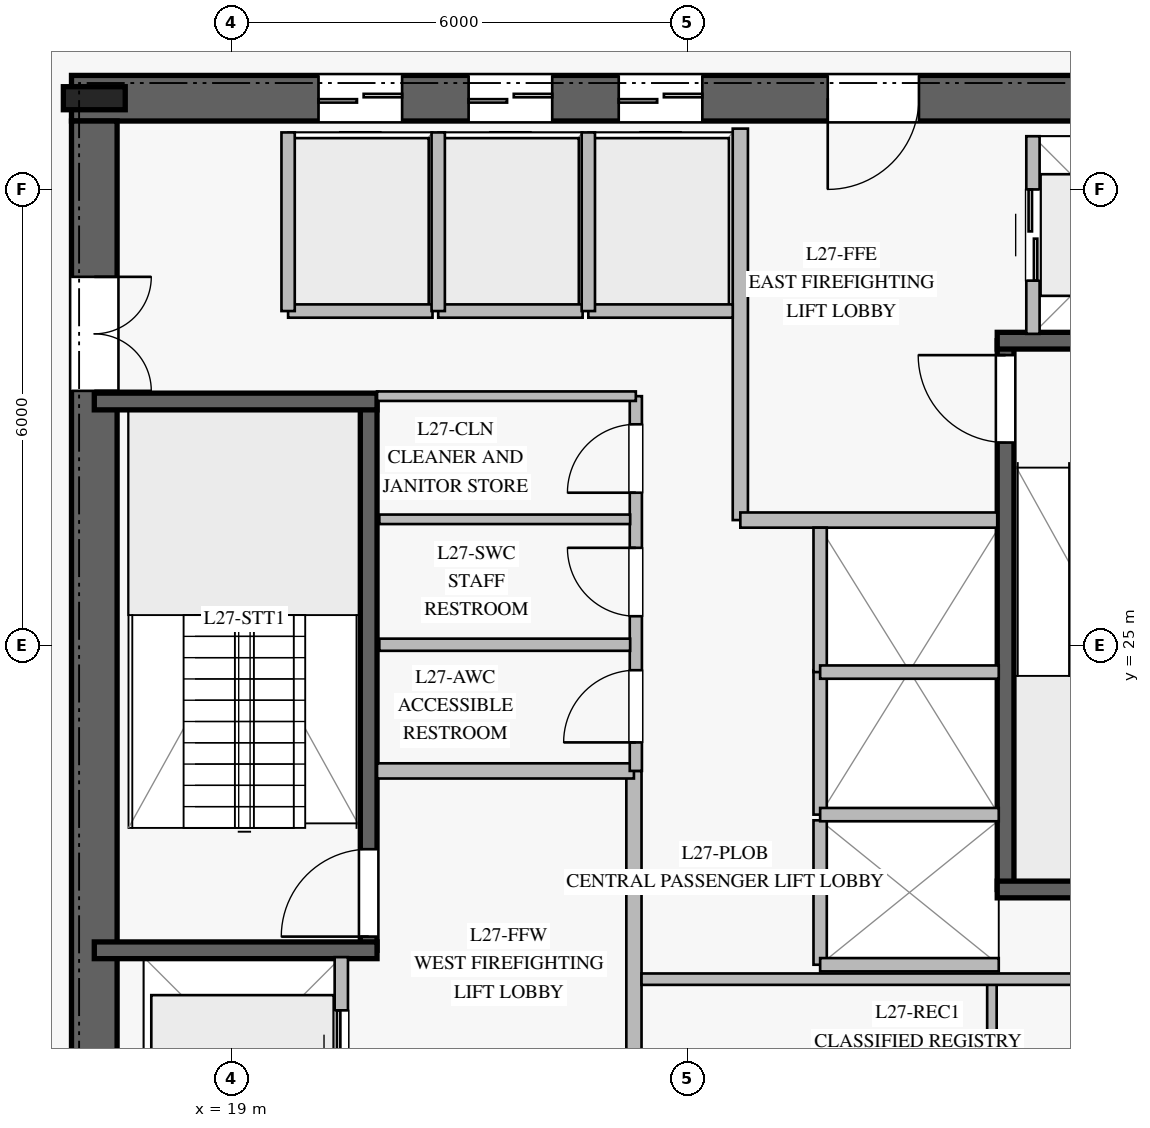
"""IFC4 building model, lengths in metres.
Left out: names, types, materials, properties, quantities, classifications, styles, units other than length and angle.
Written with IfcOpenShell. Run it as: python <this file> out.ifc"""

import sys

from ifc_helpers import new_model, si_unit, direction, frame, frame_2d, origin, origin_2d, place, context, subcontext, project, spatial, rectangle, i_section, extrude, element, fill, save


model = new_model("IFC4")
c1 = context("Model", 3, precision=1e-05, world=origin(), true_north=direction((0.0, 1.0)))
c2 = subcontext(c1, "Body", "Model", "MODEL_VIEW")
j1 = project(units=[si_unit("LENGTHUNIT", "METRE"), si_unit("PLANEANGLEUNIT", "RADIAN")], contexts=[c1])
p1 = place(None, origin())
s1 = spatial("IfcSite", under=j1, at=p1, CompositionType="ELEMENT")
p2 = place(p1, origin())
s2 = spatial("IfcBuilding", under=s1, at=p2, CompositionType="ELEMENT")
p3 = place(p2, frame((0.0, 0.0, 114.4)))
s3 = spatial("IfcBuildingStorey", under=s2, at=p3, CompositionType="ELEMENT", Elevation=114.4)
p4 = place(p3, frame((33.1, 32.2, 0.0), z_axis=(0.0, 0.0, 1.0), x_axis=(-1.0, 0.0, 0.0)))
e1 = element("IfcWall", 1, at=p4, inside=s3, PredefinedType="SHEAR", context=c2, shape_type="SweptSolid", body=[
    extrude(rectangle(XDim=16.2, YDim=0.6, at=frame_2d((8.1, 0.0))), origin(), (0.0, 0.0, 1.0), 3.76),
])
p5 = place(p4, frame((5.05, 0.0, 0.0)))
e2 = element("IfcOpeningElement", 2, at=p5, cuts=e1, PredefinedType="OPENING", context=c2, shape_type="SweptSolid", body=[
    extrude(rectangle(XDim=1.2, YDim=2.25, at=frame_2d((0.6, 1.125))), frame((0.0, 0.31, 0.0), z_axis=(0.0, -1.0, 0.0), x_axis=(1.0, 0.0, 0.0)), (0.0, 0.0, 1.0), 0.62),
])
p6 = place(p4, frame((11.85, 0.0, 0.0)))
e3 = element("IfcOpeningElement", 3, at=p6, cuts=e1, PredefinedType="OPENING", context=c2, shape_type="SweptSolid", body=[
    extrude(rectangle(XDim=1.1, YDim=2.2, at=frame_2d((0.55, 1.1))), frame((0.0, 0.31, 0.0), z_axis=(0.0, -1.0, 0.0), x_axis=(1.0, 0.0, 0.0)), (0.0, 0.0, 1.0), 0.62),
])
p7 = place(p4, frame((9.875, 0.0, 0.0)))
e4 = element("IfcOpeningElement", 4, at=p7, cuts=e1, PredefinedType="OPENING", context=c2, shape_type="SweptSolid", body=[
    extrude(rectangle(XDim=1.1, YDim=2.2, at=frame_2d((0.55, 1.1))), frame((0.0, 0.31, 0.0), z_axis=(0.0, -1.0, 0.0), x_axis=(1.0, 0.0, 0.0)), (0.0, 0.0, 1.0), 0.62),
])
p8 = place(p4, frame((7.9, 0.0, 0.0)))
e5 = element("IfcOpeningElement", 5, at=p8, cuts=e1, PredefinedType="OPENING", context=c2, shape_type="SweptSolid", body=[
    extrude(rectangle(XDim=1.1, YDim=2.2, at=frame_2d((0.55, 1.1))), frame((0.0, 0.31, 0.0), z_axis=(0.0, -1.0, 0.0), x_axis=(1.0, 0.0, 0.0)), (0.0, 0.0, 1.0), 0.62),
])
p9 = place(p3, frame((17.2, 31.9, 0.0), z_axis=(0.0, 0.0, 1.0), x_axis=(0.0, -1.0, 0.0)))
e6 = element("IfcWall", 6, at=p9, inside=s3, PredefinedType="SHEAR", context=c2, shape_type="SweptSolid", body=[
    extrude(rectangle(XDim=13.8, YDim=0.6, at=frame_2d((6.9, 0.0))), origin(), (0.0, 0.0, 1.0), 3.76),
])
p10 = place(p9, frame((2.05, 0.0, 0.0)))
e7 = element("IfcOpeningElement", 7, at=p10, cuts=e6, PredefinedType="OPENING", context=c2, shape_type="SweptSolid", body=[
    extrude(rectangle(XDim=1.5, YDim=2.2, at=frame_2d((0.75, 1.1))), frame((0.0, 0.31, 0.0), z_axis=(0.0, -1.0, 0.0), x_axis=(1.0, 0.0, 0.0)), (0.0, 0.0, 1.0), 0.62),
])
p11 = place(p3, frame((17.2, 32.2, 0.0), z_axis=(0.0, 0.0, 1.0), x_axis=(1.0, 0.0, 0.0)))
e8 = element("IfcColumn", 8, at=p11, inside=s3, PredefinedType="COLUMN", context=c2, shape_type="SweptSolid", body=[
    extrude(i_section(OverallWidth=0.303, OverallDepth=0.814, WebThickness=0.021, FlangeThickness=0.04, at=origin_2d()), origin(), (0.0, 0.0, 1.0), 4.0),
])
p12 = place(p3, frame((20.81, 20.99, 0.0), z_axis=(0.0, 0.0, 1.0), x_axis=(0.0, 1.0, 0.0)))
e9 = element("IfcWall", 9, at=p12, inside=s3, PredefinedType="SOLIDWALL", context=c2, shape_type="SweptSolid", body=[
    extrude(rectangle(XDim=7.22, YDim=0.22, at=frame_2d((3.61, 0.0))), origin(), (0.0, 0.0, 1.0), 3.76),
])
p13 = place(p12, frame((0.18, 0.0, 0.0)))
e10 = element("IfcOpeningElement", 10, at=p13, cuts=e9, PredefinedType="OPENING", context=c2, shape_type="SweptSolid", body=[
    extrude(rectangle(XDim=1.15, YDim=2.2, at=frame_2d((0.575, 1.1))), frame((0.0, 0.12, 0.0), z_axis=(0.0, -1.0, 0.0), x_axis=(1.0, 0.0, 0.0)), (0.0, 0.0, 1.0), 0.24),
])
for number, where, z_axis, x_axis in (
    (11, (17.2, 20.99, 0.0), (0.0, 0.0, 1.0), (1.0, 0.0, 0.0)),
    (12, (17.2, 28.21, 0.0), (0.0, 0.0, 1.0), (1.0, 0.0, 0.0)),
):
    element("IfcWall", number, at=place(p3, frame(where, z_axis=z_axis, x_axis=x_axis)), inside=s3, PredefinedType="SOLIDWALL", context=c2, shape_type="SweptSolid", body=[
        extrude(rectangle(XDim=3.72, YDim=0.22, at=frame_2d((1.86, 0.0))), origin(), (0.0, 0.0, 1.0), 3.76),
    ])
p14 = place(p3, frame((29.19, 21.79, 0.0), z_axis=(0.0, 0.0, 1.0), x_axis=(0.0, 1.0, 0.0)))
e13 = element("IfcWall", 13, at=p14, inside=s3, PredefinedType="SOLIDWALL", context=c2, shape_type="SweptSolid", body=[
    extrude(rectangle(XDim=7.22, YDim=0.22, at=frame_2d((3.61, 0.0))), origin(), (0.0, 0.0, 1.0), 3.76),
])
p15 = place(p14, frame((5.88, 0.0, 0.0)))
e14 = element("IfcOpeningElement", 14, at=p15, cuts=e13, PredefinedType="OPENING", context=c2, shape_type="SweptSolid", body=[
    extrude(rectangle(XDim=1.15, YDim=2.2, at=frame_2d((0.575, 1.1))), frame((0.0, 0.12, 0.0), z_axis=(0.0, -1.0, 0.0), x_axis=(1.0, 0.0, 0.0)), (0.0, 0.0, 1.0), 0.24),
])
for number, where, z_axis, x_axis in (
    (15, (29.08, 21.79, 0.0), (0.0, 0.0, 1.0), (1.0, 0.0, 0.0)),
    (16, (29.08, 29.01, 0.0), (0.0, 0.0, 1.0), (1.0, 0.0, 0.0)),
):
    element("IfcWall", number, at=place(p3, frame(where, z_axis=z_axis, x_axis=x_axis)), inside=s3, PredefinedType="SOLIDWALL", context=c2, shape_type="SweptSolid", body=[
        extrude(rectangle(XDim=3.72, YDim=0.22, at=frame_2d((1.86, 0.0))), origin(), (0.0, 0.0, 1.0), 3.76),
    ])
p16 = place(p3, frame((24.3, 18.2, 0.0), z_axis=(0.0, 0.0, 1.0), x_axis=(0.0, 1.0, 0.0)))
e17 = element("IfcWall", 17, at=p16, inside=s3, PredefinedType="PARTITIONING", context=c2, shape_type="SweptSolid", body=[
    extrude(rectangle(XDim=5.15, YDim=0.2, at=frame_2d((2.575, 0.0))), origin(), (0.0, 0.0, 1.0), 3.76),
])
p17 = place(p3, frame((20.92, 23.35, 0.0), z_axis=(0.0, 0.0, 1.0), x_axis=(1.0, 0.0, 0.0)))
e18 = element("IfcWall", 18, at=p17, inside=s3, PredefinedType="PARTITIONING", context=c2, shape_type="SweptSolid", body=[
    extrude(rectangle(XDim=3.38, YDim=0.2, at=frame_2d((1.69, 0.0))), origin(), (0.0, 0.0, 1.0), 3.76),
])
p18 = place(p3, frame((25.7, 26.65, 0.0), z_axis=(0.0, 0.0, 1.0), x_axis=(0.0, 1.0, 0.0)))
e19 = element("IfcWall", 19, at=p18, inside=s3, PredefinedType="PARTITIONING", context=c2, shape_type="SweptSolid", body=[
    extrude(rectangle(XDim=5.15, YDim=0.2, at=frame_2d((2.575, 0.0))), origin(), (0.0, 0.0, 1.0), 3.76),
])
p19 = place(p3, frame((25.7, 26.65, 0.0), z_axis=(0.0, 0.0, 1.0), x_axis=(1.0, 0.0, 0.0)))
e20 = element("IfcWall", 20, at=p19, inside=s3, PredefinedType="PARTITIONING", context=c2, shape_type="SweptSolid", body=[
    extrude(rectangle(XDim=3.38, YDim=0.2, at=frame_2d((1.69, 0.0))), origin(), (0.0, 0.0, 1.0), 3.76),
])
p20 = place(p3, frame((24.325, 23.35, 0.0), z_axis=(0.0, 0.0, 1.0), x_axis=(0.0, 1.0, 0.0)))
e21 = element("IfcWall", 21, at=p20, inside=s3, PredefinedType="PLUMBINGWALL", context=c2, shape_type="SweptSolid", body=[
    extrude(rectangle(XDim=4.93, YDim=0.16, at=frame_2d((2.465, 0.0))), origin(), (0.0, 0.0, 1.0), 3.76),
])
p21 = place(p20, frame((0.375, 0.0, 0.0)))
e22 = element("IfcOpeningElement", 22, at=p21, cuts=e21, PredefinedType="OPENING", context=c2, shape_type="SweptSolid", body=[
    extrude(rectangle(XDim=0.95, YDim=2.1, at=frame_2d((0.475, 1.05))), frame((0.0, 0.09, 0.0), z_axis=(0.0, -1.0, 0.0), x_axis=(1.0, 0.0, 0.0)), (0.0, 0.0, 1.0), 0.18),
])
p22 = place(p20, frame((2.035, 0.0, 0.0)))
e23 = element("IfcOpeningElement", 23, at=p22, cuts=e21, PredefinedType="OPENING", context=c2, shape_type="SweptSolid", body=[
    extrude(rectangle(XDim=0.9, YDim=2.1, at=frame_2d((0.45, 1.05))), frame((0.0, 0.09, 0.0), z_axis=(0.0, -1.0, 0.0), x_axis=(1.0, 0.0, 0.0)), (0.0, 0.0, 1.0), 0.18),
])
p23 = place(p20, frame((3.66, 0.0, 0.0)))
e24 = element("IfcOpeningElement", 24, at=p23, cuts=e21, PredefinedType="OPENING", context=c2, shape_type="SweptSolid", body=[
    extrude(rectangle(XDim=0.9, YDim=2.1, at=frame_2d((0.45, 1.05))), frame((0.0, 0.09, 0.0), z_axis=(0.0, -1.0, 0.0), x_axis=(1.0, 0.0, 0.0)), (0.0, 0.0, 1.0), 0.18),
])
p24 = place(p3, frame((20.92, 28.28, 0.0), z_axis=(0.0, 0.0, 1.0), x_axis=(1.0, 0.0, 0.0)))
e25 = element("IfcWall", 25, at=p24, inside=s3, PredefinedType="PARTITIONING", context=c2, shape_type="SweptSolid", body=[
    extrude(rectangle(XDim=3.405, YDim=0.125, at=frame_2d((1.703, 0.0))), origin(), (0.0, 0.0, 1.0), 3.76),
])
p25 = place(p3, frame((29.01, 18.1, 0.0), z_axis=(0.0, 0.0, 1.0), x_axis=(0.0, 1.0, 0.0)))
e26 = element("IfcWall", 26, at=p25, inside=s3, PredefinedType="PARTITIONING", context=c2, shape_type="SweptSolid", body=[
    extrude(rectangle(XDim=2.45, YDim=0.125, at=frame_2d((1.225, 0.0))), origin(), (0.0, 0.0, 1.0), 3.76),
])
p26 = place(p3, frame((20.95, 25.01, 0.0), z_axis=(0.0, 0.0, 1.0), x_axis=(1.0, 0.0, 0.0)))
e27 = element("IfcWall", 27, at=p26, inside=s3, PredefinedType="PLUMBINGWALL", context=c2, shape_type="SweptSolid", body=[
    extrude(rectangle(XDim=3.3, YDim=0.16, at=frame_2d((1.65, 0.0))), origin(), (0.0, 0.0, 1.0), 3.76),
])
p27 = place(p3, frame((20.95, 26.66, 0.0), z_axis=(0.0, 0.0, 1.0), x_axis=(1.0, 0.0, 0.0)))
e28 = element("IfcWall", 28, at=p27, inside=s3, PredefinedType="PARTITIONING", context=c2, shape_type="SweptSolid", body=[
    extrude(rectangle(XDim=3.3, YDim=0.125, at=frame_2d((1.65, 0.0))), origin(), (0.0, 0.0, 1.0), 3.76),
])
p28 = place(p3, frame((24.4, 20.61, 0.0), z_axis=(0.0, 0.0, 1.0), x_axis=(1.0, 0.0, 0.0)))
e29 = element("IfcWall", 29, at=p28, inside=s3, PredefinedType="PARTITIONING", context=c2, shape_type="SweptSolid", body=[
    extrude(rectangle(XDim=5.9, YDim=0.15, at=frame_2d((2.95, 0.0))), origin(), (0.0, 0.0, 1.0), 3.76),
])
p29 = place(p3, frame((19.75, 29.4, 0.0), z_axis=(0.0, 0.0, 1.0), x_axis=(1.0, 0.0, 0.0)))
e30 = element("IfcWall", 30, at=p29, inside=s3, PredefinedType="PARTITIONING", context=c2, shape_type="SweptSolid", body=[
    extrude(rectangle(XDim=1.9, YDim=0.175, at=frame_2d((0.95, 0.0))), origin(), (0.0, 0.0, 1.0), 3.76),
])
p30 = place(p3, frame((19.75, 29.4, 0.0), z_axis=(0.0, 0.0, 1.0), x_axis=(0.0, 1.0, 0.0)))
e31 = element("IfcWall", 31, at=p30, inside=s3, PredefinedType="PARTITIONING", context=c2, shape_type="SweptSolid", body=[
    extrude(rectangle(XDim=2.35, YDim=0.175, at=frame_2d((1.175, 0.0))), origin(), (0.0, 0.0, 1.0), 3.76),
])
p31 = place(p3, frame((21.725, 29.4, 0.0), z_axis=(0.0, 0.0, 1.0), x_axis=(1.0, 0.0, 0.0)))
e32 = element("IfcWall", 32, at=p31, inside=s3, PredefinedType="PARTITIONING", context=c2, shape_type="SweptSolid", body=[
    extrude(rectangle(XDim=1.9, YDim=0.175, at=frame_2d((0.95, 0.0))), origin(), (0.0, 0.0, 1.0), 3.76),
])
p32 = place(p3, frame((21.725, 29.4, 0.0), z_axis=(0.0, 0.0, 1.0), x_axis=(0.0, 1.0, 0.0)))
e33 = element("IfcWall", 33, at=p32, inside=s3, PredefinedType="PARTITIONING", context=c2, shape_type="SweptSolid", body=[
    extrude(rectangle(XDim=2.35, YDim=0.175, at=frame_2d((1.175, 0.0))), origin(), (0.0, 0.0, 1.0), 3.76),
])
p33 = place(p3, frame((23.7, 29.4, 0.0), z_axis=(0.0, 0.0, 1.0), x_axis=(1.0, 0.0, 0.0)))
e34 = element("IfcWall", 34, at=p33, inside=s3, PredefinedType="PARTITIONING", context=c2, shape_type="SweptSolid", body=[
    extrude(rectangle(XDim=1.9, YDim=0.175, at=frame_2d((0.95, 0.0))), origin(), (0.0, 0.0, 1.0), 3.76),
])
p34 = place(p3, frame((23.7, 29.4, 0.0), z_axis=(0.0, 0.0, 1.0), x_axis=(0.0, 1.0, 0.0)))
e35 = element("IfcWall", 35, at=p34, inside=s3, PredefinedType="PARTITIONING", context=c2, shape_type="SweptSolid", body=[
    extrude(rectangle(XDim=2.35, YDim=0.175, at=frame_2d((1.175, 0.0))), origin(), (0.0, 0.0, 1.0), 3.76),
])
p35 = place(p3, frame((26.75, 20.8, 0.0), z_axis=(0.0, 0.0, 1.0), x_axis=(0.0, 1.0, 0.0)))
e36 = element("IfcWall", 36, at=p35, inside=s3, PredefinedType="PARTITIONING", context=c2, shape_type="SweptSolid", body=[
    extrude(rectangle(XDim=1.9, YDim=0.175, at=frame_2d((0.95, 0.0))), origin(), (0.0, 0.0, 1.0), 3.76),
])
p36 = place(p3, frame((26.75, 20.8, 0.0), z_axis=(0.0, 0.0, 1.0), x_axis=(1.0, 0.0, 0.0)))
e37 = element("IfcWall", 37, at=p36, inside=s3, PredefinedType="PARTITIONING", context=c2, shape_type="SweptSolid", body=[
    extrude(rectangle(XDim=2.35, YDim=0.175, at=frame_2d((1.175, 0.0))), origin(), (0.0, 0.0, 1.0), 3.76),
])
p37 = place(p3, frame((26.75, 22.775, 0.0), z_axis=(0.0, 0.0, 1.0), x_axis=(0.0, 1.0, 0.0)))
e38 = element("IfcWall", 38, at=p37, inside=s3, PredefinedType="PARTITIONING", context=c2, shape_type="SweptSolid", body=[
    extrude(rectangle(XDim=1.9, YDim=0.175, at=frame_2d((0.95, 0.0))), origin(), (0.0, 0.0, 1.0), 3.76),
])
p38 = place(p3, frame((26.75, 22.775, 0.0), z_axis=(0.0, 0.0, 1.0), x_axis=(1.0, 0.0, 0.0)))
e39 = element("IfcWall", 39, at=p38, inside=s3, PredefinedType="PARTITIONING", context=c2, shape_type="SweptSolid", body=[
    extrude(rectangle(XDim=2.35, YDim=0.175, at=frame_2d((1.175, 0.0))), origin(), (0.0, 0.0, 1.0), 3.76),
])
p39 = place(p3, frame((26.75, 24.65, 0.0), z_axis=(0.0, 0.0, 1.0), x_axis=(0.0, 1.0, 0.0)))
e40 = element("IfcWall", 40, at=p39, inside=s3, PredefinedType="PARTITIONING", context=c2, shape_type="SweptSolid", body=[
    extrude(rectangle(XDim=1.9, YDim=0.175, at=frame_2d((0.95, 0.0))), origin(), (0.0, 0.0, 1.0), 3.76),
])
p40 = place(p3, frame((26.75, 24.65, 0.0), z_axis=(0.0, 0.0, 1.0), x_axis=(1.0, 0.0, 0.0)))
e41 = element("IfcWall", 41, at=p40, inside=s3, PredefinedType="PARTITIONING", context=c2, shape_type="SweptSolid", body=[
    extrude(rectangle(XDim=2.35, YDim=0.175, at=frame_2d((1.175, 0.0))), origin(), (0.0, 0.0, 1.0), 3.76),
])
p41 = place(p3, frame((20.45, 18.3, 0.0), z_axis=(0.0, 0.0, 1.0), x_axis=(0.0, 1.0, 0.0)))
e42 = element("IfcWall", 42, at=p41, inside=s3, PredefinedType="PARTITIONING", context=c2, shape_type="SweptSolid", body=[
    extrude(rectangle(XDim=2.6, YDim=0.175, at=frame_2d((1.3, 0.0))), origin(), (0.0, 0.0, 1.0), 3.76),
])
p42 = place(p41, frame((0.7, 0.0, 0.0)))
e43 = element("IfcOpeningElement", 43, at=p42, cuts=e42, PredefinedType="OPENING", context=c2, shape_type="SweptSolid", body=[
    extrude(rectangle(XDim=1.2, YDim=2.2, at=frame_2d((0.6, 1.1))), frame((0.0, 0.098, 0.0), z_axis=(0.0, -1.0, 0.0), x_axis=(1.0, 0.0, 0.0)), (0.0, 0.0, 1.0), 0.195),
])
p43 = place(p3, frame((29.55, 29.1, 0.0), z_axis=(0.0, 0.0, 1.0), x_axis=(0.0, 1.0, 0.0)))
e44 = element("IfcWall", 44, at=p43, inside=s3, PredefinedType="PARTITIONING", context=c2, shape_type="SweptSolid", body=[
    extrude(rectangle(XDim=2.6, YDim=0.175, at=frame_2d((1.3, 0.0))), origin(), (0.0, 0.0, 1.0), 3.76),
])
p44 = place(p43, frame((0.7, 0.0, 0.0)))
e45 = element("IfcOpeningElement", 45, at=p44, cuts=e44, PredefinedType="OPENING", context=c2, shape_type="SweptSolid", body=[
    extrude(rectangle(XDim=1.2, YDim=2.2, at=frame_2d((0.6, 1.1))), frame((0.0, 0.098, 0.0), z_axis=(0.0, -1.0, 0.0), x_axis=(1.0, 0.0, 0.0)), (0.0, 0.0, 1.0), 0.195),
])
p45 = place(p13, origin())
e46 = element("IfcDoor", 46, at=p45, inside=s3, OperationType="SINGLE_SWING_LEFT", PredefinedType="DOOR", context=c2, shape_type="SweptSolid", body=[
    extrude(rectangle(XDim=1.15, YDim=2.2, at=frame_2d((0.575, 1.1))), frame((0.0, 0.025, 0.0), z_axis=(0.0, -1.0, 0.0), x_axis=(1.0, 0.0, 0.0)), (0.0, 0.0, 1.0), 0.05),
])
fill(e10, e46)
p46 = place(p15, origin())
e47 = element("IfcDoor", 47, at=p46, inside=s3, OperationType="SINGLE_SWING_RIGHT", PredefinedType="DOOR", context=c2, shape_type="SweptSolid", body=[
    extrude(rectangle(XDim=1.15, YDim=2.2, at=frame_2d((0.575, 1.1))), frame((0.0, 0.025, 0.0), z_axis=(0.0, -1.0, 0.0), x_axis=(1.0, 0.0, 0.0)), (0.0, 0.0, 1.0), 0.05),
])
fill(e14, e47)
p47 = place(p5, origin())
e48 = element("IfcDoor", 48, at=p47, inside=s3, OperationType="SINGLE_SWING_RIGHT", PredefinedType="DOOR", context=c2, shape_type="SweptSolid", body=[
    extrude(rectangle(XDim=1.2, YDim=2.25, at=frame_2d((0.6, 1.125))), frame((0.0, 0.025, 0.0), z_axis=(0.0, -1.0, 0.0), x_axis=(1.0, 0.0, 0.0)), (0.0, 0.0, 1.0), 0.05),
])
fill(e2, e48)
p48 = place(p10, origin())
e49 = element("IfcDoor", 49, at=p48, inside=s3, OperationType="DOUBLE_DOOR_SINGLE_SWING", PredefinedType="DOOR", context=c2, shape_type="SweptSolid", body=[
    extrude(rectangle(XDim=1.5, YDim=2.2, at=frame_2d((0.75, 1.1))), frame((0.0, 0.025, 0.0), z_axis=(0.0, -1.0, 0.0), x_axis=(1.0, 0.0, 0.0)), (0.0, 0.0, 1.0), 0.05),
])
fill(e7, e49)
p49 = place(p21, origin())
e50 = element("IfcDoor", 50, at=p49, inside=s3, OperationType="SINGLE_SWING_LEFT", PredefinedType="DOOR", context=c2, shape_type="SweptSolid", body=[
    extrude(rectangle(XDim=0.95, YDim=2.1, at=frame_2d((0.475, 1.05))), frame((0.0, 0.025, 0.0), z_axis=(0.0, -1.0, 0.0), x_axis=(1.0, 0.0, 0.0)), (0.0, 0.0, 1.0), 0.05),
])
fill(e22, e50)
p50 = place(p22, origin())
e51 = element("IfcDoor", 51, at=p50, inside=s3, OperationType="SINGLE_SWING_RIGHT", PredefinedType="DOOR", context=c2, shape_type="SweptSolid", body=[
    extrude(rectangle(XDim=0.9, YDim=2.1, at=frame_2d((0.45, 1.05))), frame((0.0, 0.025, 0.0), z_axis=(0.0, -1.0, 0.0), x_axis=(1.0, 0.0, 0.0)), (0.0, 0.0, 1.0), 0.05),
])
fill(e23, e51)
p51 = place(p23, origin())
e52 = element("IfcDoor", 52, at=p51, inside=s3, OperationType="SINGLE_SWING_LEFT", PredefinedType="DOOR", context=c2, shape_type="SweptSolid", body=[
    extrude(rectangle(XDim=0.9, YDim=2.1, at=frame_2d((0.45, 1.05))), frame((0.0, 0.025, 0.0), z_axis=(0.0, -1.0, 0.0), x_axis=(1.0, 0.0, 0.0)), (0.0, 0.0, 1.0), 0.05),
])
fill(e24, e52)
p52 = place(p6, origin())
e53 = element("IfcDoor", 53, at=p52, inside=s3, OperationType="DOUBLE_DOOR_SLIDING", PredefinedType="DOOR", context=c2, shape_type="SweptSolid", body=[
    extrude(rectangle(XDim=1.1, YDim=2.2, at=frame_2d((0.55, 1.1))), frame((0.0, 0.025, 0.0), z_axis=(0.0, -1.0, 0.0), x_axis=(1.0, 0.0, 0.0)), (0.0, 0.0, 1.0), 0.05),
])
fill(e3, e53)
p53 = place(p7, origin())
e54 = element("IfcDoor", 54, at=p53, inside=s3, OperationType="DOUBLE_DOOR_SLIDING", PredefinedType="DOOR", context=c2, shape_type="SweptSolid", body=[
    extrude(rectangle(XDim=1.1, YDim=2.2, at=frame_2d((0.55, 1.1))), frame((0.0, 0.025, 0.0), z_axis=(0.0, -1.0, 0.0), x_axis=(1.0, 0.0, 0.0)), (0.0, 0.0, 1.0), 0.05),
])
fill(e4, e54)
p54 = place(p8, origin())
e55 = element("IfcDoor", 55, at=p54, inside=s3, OperationType="DOUBLE_DOOR_SLIDING", PredefinedType="DOOR", context=c2, shape_type="SweptSolid", body=[
    extrude(rectangle(XDim=1.1, YDim=2.2, at=frame_2d((0.55, 1.1))), frame((0.0, 0.025, 0.0), z_axis=(0.0, -1.0, 0.0), x_axis=(1.0, 0.0, 0.0)), (0.0, 0.0, 1.0), 0.05),
])
fill(e5, e55)
p55 = place(p42, origin())
e56 = element("IfcDoor", 56, at=p55, inside=s3, OperationType="DOUBLE_DOOR_SLIDING", PredefinedType="DOOR", context=c2, shape_type="SweptSolid", body=[
    extrude(rectangle(XDim=1.2, YDim=2.2, at=frame_2d((0.6, 1.1))), frame((0.0, 0.025, 0.0), z_axis=(0.0, -1.0, 0.0), x_axis=(1.0, 0.0, 0.0)), (0.0, 0.0, 1.0), 0.05),
])
fill(e43, e56)
p56 = place(p44, origin())
e57 = element("IfcDoor", 57, at=p56, inside=s3, OperationType="DOUBLE_DOOR_SLIDING", PredefinedType="DOOR", context=c2, shape_type="SweptSolid", body=[
    extrude(rectangle(XDim=1.2, YDim=2.2, at=frame_2d((0.6, 1.1))), frame((0.0, 0.025, 0.0), z_axis=(0.0, -1.0, 0.0), x_axis=(1.0, 0.0, 0.0)), (0.0, 0.0, 1.0), 0.05),
])
fill(e45, e57)
save(model, sys.argv[1])
